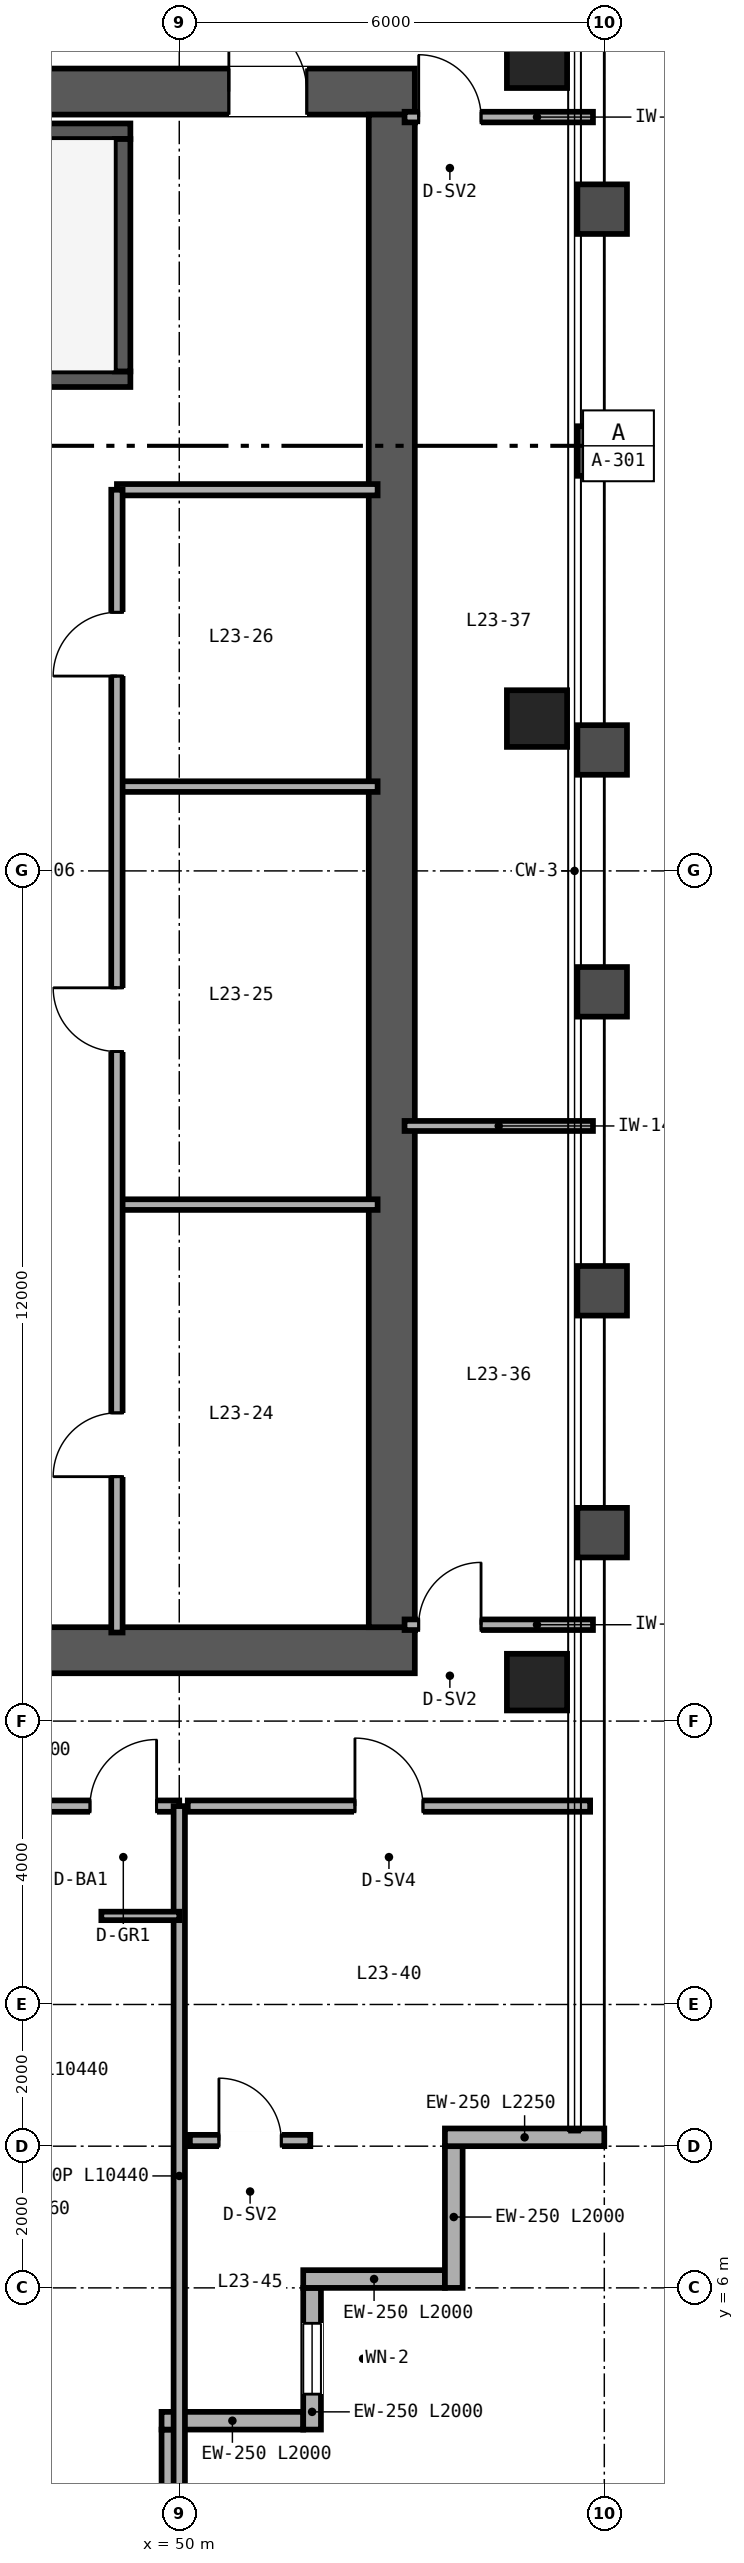
"""IFC4 building model, lengths in metres.
Left out: names, types, materials, properties, quantities, classifications, styles, units other than length and angle.
Written with IfcOpenShell. Run it as: python <this file> out.ifc"""

import sys

from ifc_helpers import new_model, si_unit, direction, frame, frame_2d, origin, origin_2d, place, context, subcontext, project, spatial, rectangle, hollow_rectangle, extrude, source, transform, mapped, element, fill, save


model = new_model("IFC4")
c1 = context("Model", 3, precision=1e-05, world=origin(), true_north=direction((0.0, 1.0)))
c2 = subcontext(c1, "Body", "Model", "MODEL_VIEW")
j1 = project(units=[si_unit("LENGTHUNIT", "METRE"), si_unit("PLANEANGLEUNIT", "RADIAN")], contexts=[c1])
p1 = place(None, origin())
s1 = spatial("IfcSite", under=j1, at=p1, CompositionType="ELEMENT")
p2 = place(p1, origin())
s2 = spatial("IfcBuilding", under=s1, at=p2, CompositionType="ELEMENT")
p3 = place(p2, frame((0.0, 0.0, 97.2)))
s3 = spatial("IfcBuildingStorey", under=s2, at=p3, CompositionType="ELEMENT", Elevation=97.2)
p4 = place(p3, frame((40.675, 15.0, 0.0), z_axis=(0.0, 0.0, 1.0), x_axis=(1.0, 0.0, 0.0)))
e1 = element("IfcWall", 1, at=p4, inside=s3, PredefinedType="SHEAR", context=c2, shape_type="SweptSolid", body=[
    extrude(rectangle(XDim=12.65, YDim=0.65, at=frame_2d((6.325, 0.0))), origin(), (0.0, 0.0, 1.0), 3.36),
])
p5 = place(p4, frame((4.425, 0.0, 0.0)))
e2 = element("IfcOpeningElement", 2, at=p5, cuts=e1, PredefinedType="OPENING", context=c2, shape_type="SweptSolid", body=[
    extrude(rectangle(XDim=1.0, YDim=2.15, at=frame_2d((0.5, 1.075))), frame((0.0, 0.335, 0.0), z_axis=(0.0, -1.0, 0.0), x_axis=(1.0, 0.0, 0.0)), (0.0, 0.0, 1.0), 0.67),
])
p6 = place(p3, frame((40.675, 37.0, 0.0), z_axis=(0.0, 0.0, 1.0), x_axis=(1.0, 0.0, 0.0)))
e3 = element("IfcWall", 3, at=p6, inside=s3, PredefinedType="SHEAR", context=c2, shape_type="SweptSolid", body=[
    extrude(rectangle(XDim=12.65, YDim=0.65, at=frame_2d((6.325, 0.0))), origin(), (0.0, 0.0, 1.0), 3.36),
])
p7 = place(p6, frame((10.025, 0.0, 0.0)))
e4 = element("IfcOpeningElement", 4, at=p7, cuts=e3, PredefinedType="OPENING", context=c2, shape_type="SweptSolid", body=[
    extrude(rectangle(XDim=1.1, YDim=2.15, at=frame_2d((0.55, 1.075))), frame((0.0, 0.335, 0.0), z_axis=(0.0, -1.0, 0.0), x_axis=(1.0, 0.0, 0.0)), (0.0, 0.0, 1.0), 0.67),
])
p8 = place(p3, frame((53.0, 15.325, 0.0), z_axis=(0.0, 0.0, 1.0), x_axis=(0.0, 1.0, 0.0)))
e5 = element("IfcWall", 5, at=p8, inside=s3, PredefinedType="SHEAR", context=c2, shape_type="SweptSolid", body=[
    extrude(rectangle(XDim=21.35, YDim=0.65, at=frame_2d((10.675, 0.0))), origin(), (0.0, 0.0, 1.0), 3.36),
])
p9 = place(p3, frame((41.325, 32.94, 0.0), z_axis=(0.0, 0.0, 1.0), x_axis=(1.0, 0.0, 0.0)))
e6 = element("IfcWall", 6, at=p9, inside=s3, PredefinedType="SHEAR", context=c2, shape_type="SweptSolid", body=[
    extrude(rectangle(XDim=7.985, YDim=0.22, at=frame_2d((3.993, 0.0))), origin(), (0.0, 0.0, 1.0), 3.4),
])
p10 = place(p9, frame((0.595, 0.0, 0.0)))
e7 = element("IfcOpeningElement", 7, at=p10, cuts=e6, PredefinedType="OPENING", context=c2, shape_type="SweptSolid", body=[
    extrude(rectangle(XDim=1.05, YDim=2.15, at=frame_2d((0.525, 1.075))), frame((0.0, 0.12, 0.0), z_axis=(0.0, -1.0, 0.0), x_axis=(1.0, 0.0, 0.0)), (0.0, 0.0, 1.0), 0.24),
])
p11 = place(p3, frame((41.325, 36.44, 0.0), z_axis=(0.0, 0.0, 1.0), x_axis=(1.0, 0.0, 0.0)))
e8 = element("IfcWall", 8, at=p11, inside=s3, PredefinedType="SHEAR", context=c2, shape_type="SweptSolid", body=[
    extrude(rectangle(XDim=7.985, YDim=0.22, at=frame_2d((3.993, 0.0))), origin(), (0.0, 0.0, 1.0), 3.4),
])
p12 = place(p3, frame((49.2, 33.05, 0.0), z_axis=(0.0, 0.0, 1.0), x_axis=(0.0, 1.0, 0.0)))
e9 = element("IfcWall", 9, at=p12, inside=s3, PredefinedType="SHEAR", context=c2, shape_type="SweptSolid", body=[
    extrude(rectangle(XDim=3.28, YDim=0.22, at=frame_2d((1.64, 0.0))), origin(), (0.0, 0.0, 1.0), 3.4),
])
m1 = source(origin(), c2, "Body", "SweptSolid", [
    extrude(hollow_rectangle(XDim=0.85, YDim=0.8, WallThickness=0.032, at=origin_2d()), origin(), (0.0, 0.0, 1.0), 3.36),
])
for number, where, z_axis, x_axis in (
    (10, (55.05, 14.55, 0.0), (0.0, 0.0, 1.0), (1.0, 0.0, 0.0)),
    (11, (55.05, 28.15, 0.0), (0.0, 0.0, 1.0), (1.0, 0.0, 0.0)),
    (12, (55.05, 37.45, 0.0), (0.0, 0.0, 1.0), (1.0, 0.0, 0.0)),
):
    element("IfcColumn", number, at=place(p3, frame(where, z_axis=z_axis, x_axis=x_axis)), inside=s3, PredefinedType="COLUMN", context=c2, shape_type="MappedRepresentation", body=[
        mapped(m1, transform((0.0, 0.0, 0.0), scale=1.0)),
    ])
p13 = place(p3, frame((49.875, 2.0, 0.0), z_axis=(0.0, 0.0, 1.0), x_axis=(0.0, 1.0, 0.0)))
e13 = element("IfcWall", 13, at=p13, inside=s3, PredefinedType="SOLIDWALL", context=c2, shape_type="SweptSolid", body=[
    extrude(rectangle(XDim=2.0, YDim=0.25, at=frame_2d((1.0, 0.0))), origin(), (0.0, 0.0, 1.0), 2.667),
])
p14 = place(p3, frame((49.75, 4.125, 0.0), z_axis=(0.0, 0.0, 1.0), x_axis=(1.0, 0.0, 0.0)))
e14 = element("IfcWall", 14, at=p14, inside=s3, PredefinedType="SOLIDWALL", context=c2, shape_type="SweptSolid", body=[
    extrude(rectangle(XDim=2.0, YDim=0.25, at=frame_2d((1.0, 0.0))), origin(), (0.0, 0.0, 1.0), 3.36),
])
p15 = place(p3, frame((51.875, 4.0, 0.0), z_axis=(0.0, 0.0, 1.0), x_axis=(0.0, 1.0, 0.0)))
e15 = element("IfcWall", 15, at=p15, inside=s3, PredefinedType="SOLIDWALL", context=c2, shape_type="SweptSolid", body=[
    extrude(rectangle(XDim=2.0, YDim=0.25, at=frame_2d((1.0, 0.0))), origin(), (0.0, 0.0, 1.0), 3.36),
])
p16 = place(p15, frame((0.5, 0.0, 0.85)))
e16 = element("IfcOpeningElement", 16, at=p16, cuts=e15, PredefinedType="OPENING", context=c2, shape_type="SweptSolid", body=[
    extrude(rectangle(XDim=1.0, YDim=1.9, at=frame_2d((0.5, 0.95))), frame((0.0, 0.135, 0.0), z_axis=(0.0, -1.0, 0.0), x_axis=(1.0, 0.0, 0.0)), (0.0, 0.0, 1.0), 0.27),
])
for number, where, z_axis, x_axis in (
    (17, (51.75, 6.125, 0.0), (0.0, 0.0, 1.0), (1.0, 0.0, 0.0)),
    (18, (53.875, 6.0, 0.0), (0.0, 0.0, 1.0), (0.0, 1.0, 0.0)),
):
    element("IfcWall", number, at=place(p3, frame(where, z_axis=z_axis, x_axis=x_axis)), inside=s3, PredefinedType="SOLIDWALL", context=c2, shape_type="SweptSolid", body=[
        extrude(rectangle(XDim=2.0, YDim=0.25, at=frame_2d((1.0, 0.0))), origin(), (0.0, 0.0, 1.0), 3.36),
    ])
p17 = place(p3, frame((53.75, 8.125, 0.0), z_axis=(0.0, 0.0, 1.0), x_axis=(1.0, 0.0, 0.0)))
e19 = element("IfcWall", 19, at=p17, inside=s3, PredefinedType="SOLIDWALL", context=c2, shape_type="SweptSolid", body=[
    extrude(rectangle(XDim=2.25, YDim=0.25, at=frame_2d((1.125, 0.0))), origin(), (0.0, 0.0, 1.0), 3.36),
])
p18 = place(p3, frame((49.12, 31.38, 0.0), z_axis=(0.0, 0.0, 1.0), x_axis=(1.0, 0.0, 0.0)))
e20 = element("IfcWall", 20, at=p18, inside=s3, PredefinedType="PARTITIONING", context=c2, shape_type="SweptSolid", body=[
    extrude(rectangle(XDim=3.68, YDim=0.16, at=frame_2d((1.84, 0.0))), origin(), (0.0, 0.0, 1.0), 2.36),
])
for number, where, z_axis, x_axis in (
    (21, (49.12, 21.29, 0.0), (0.0, 0.0, 1.0), (1.0, 0.0, 0.0)),
    (22, (49.12, 27.19, 0.0), (0.0, 0.0, 1.0), (1.0, 0.0, 0.0)),
):
    element("IfcWall", number, at=place(p3, frame(where, z_axis=z_axis, x_axis=x_axis)), inside=s3, PredefinedType="PARTITIONING", context=c2, shape_type="SweptSolid", body=[
        extrude(rectangle(XDim=3.68, YDim=0.15, at=frame_2d((1.84, 0.0))), origin(), (0.0, 0.0, 1.0), 3.36),
    ])
p19 = place(p3, frame((49.12, 15.25, 0.0), z_axis=(0.0, 0.0, 1.0), x_axis=(0.0, 1.0, 0.0)))
e23 = element("IfcWall", 23, at=p19, inside=s3, PredefinedType="PARTITIONING", context=c2, shape_type="SweptSolid", body=[
    extrude(rectangle(XDim=16.13, YDim=0.16, at=frame_2d((8.065, 0.0))), origin(), (0.0, 0.0, 1.0), 2.36),
])
p20 = place(p19, frame((2.2, 0.0, 0.0)))
e24 = element("IfcOpeningElement", 24, at=p20, cuts=e23, PredefinedType="OPENING", context=c2, shape_type="SweptSolid", body=[
    extrude(rectangle(XDim=0.9, YDim=2.15, at=frame_2d((0.45, 1.075))), frame((0.0, 0.09, 0.0), z_axis=(0.0, -1.0, 0.0), x_axis=(1.0, 0.0, 0.0)), (0.0, 0.0, 1.0), 0.18),
])
p21 = place(p19, frame((8.2, 0.0, 0.0)))
e25 = element("IfcOpeningElement", 25, at=p21, cuts=e23, PredefinedType="OPENING", context=c2, shape_type="SweptSolid", body=[
    extrude(rectangle(XDim=0.9, YDim=2.15, at=frame_2d((0.45, 1.075))), frame((0.0, 0.09, 0.0), z_axis=(0.0, -1.0, 0.0), x_axis=(1.0, 0.0, 0.0)), (0.0, 0.0, 1.0), 0.18),
])
p22 = place(p19, frame((13.5, 0.0, 0.0)))
e26 = element("IfcOpeningElement", 26, at=p22, cuts=e23, PredefinedType="OPENING", context=c2, shape_type="SweptSolid", body=[
    extrude(rectangle(XDim=0.9, YDim=2.15, at=frame_2d((0.45, 1.075))), frame((0.0, 0.09, 0.0), z_axis=(0.0, -1.0, 0.0), x_axis=(1.0, 0.0, 0.0)), (0.0, 0.0, 1.0), 0.18),
])
p23 = place(p3, frame((53.18, 15.36, 0.0), z_axis=(0.0, 0.0, 1.0), x_axis=(1.0, 0.0, 0.0)))
e27 = element("IfcWall", 27, at=p23, inside=s3, PredefinedType="PARTITIONING", context=c2, shape_type="SweptSolid", body=[
    extrude(rectangle(XDim=2.66, YDim=0.15, at=frame_2d((1.33, 0.0))), origin(), (0.0, 0.0, 1.0), 2.581),
])
p24 = place(p23, frame((0.2, 0.0, 0.0)))
e28 = element("IfcOpeningElement", 28, at=p24, cuts=e27, PredefinedType="OPENING", context=c2, shape_type="SweptSolid", body=[
    extrude(rectangle(XDim=0.88, YDim=2.15, at=frame_2d((0.44, 1.075))), frame((0.0, 0.085, 0.0), z_axis=(0.0, -1.0, 0.0), x_axis=(1.0, 0.0, 0.0)), (0.0, 0.0, 1.0), 0.17),
])
p25 = place(p3, frame((53.18, 36.64, 0.0), z_axis=(0.0, 0.0, 1.0), x_axis=(1.0, 0.0, 0.0)))
e29 = element("IfcWall", 29, at=p25, inside=s3, PredefinedType="PARTITIONING", context=c2, shape_type="SweptSolid", body=[
    extrude(rectangle(XDim=2.66, YDim=0.15, at=frame_2d((1.33, 0.0))), origin(), (0.0, 0.0, 1.0), 2.743),
])
p26 = place(p25, frame((0.2, 0.0, 0.0)))
e30 = element("IfcOpeningElement", 30, at=p26, cuts=e29, PredefinedType="OPENING", context=c2, shape_type="SweptSolid", body=[
    extrude(rectangle(XDim=0.88, YDim=2.15, at=frame_2d((0.44, 1.075))), frame((0.0, 0.085, 0.0), z_axis=(0.0, -1.0, 0.0), x_axis=(1.0, 0.0, 0.0)), (0.0, 0.0, 1.0), 0.17),
])
p27 = place(p3, frame((53.18, 22.4, 0.0), z_axis=(0.0, 0.0, 1.0), x_axis=(1.0, 0.0, 0.0)))
e31 = element("IfcWall", 31, at=p27, inside=s3, PredefinedType="PARTITIONING", context=c2, shape_type="SweptSolid", body=[
    extrude(rectangle(XDim=2.66, YDim=0.142, at=frame_2d((1.33, 0.0))), origin(), (0.0, 0.0, 1.0), 2.581),
])
p28 = place(p3, frame((50.12, 12.8, 0.0), z_axis=(0.0, 0.0, 1.0), x_axis=(1.0, 0.0, 0.0)))
e32 = element("IfcWall", 32, at=p28, inside=s3, PredefinedType="PARTITIONING", context=c2, shape_type="SweptSolid", body=[
    extrude(rectangle(XDim=5.68, YDim=0.16, at=frame_2d((2.84, 0.0))), origin(), (0.0, 0.0, 1.0), 3.36),
])
p29 = place(p28, frame((2.36, 0.0, 0.0)))
e33 = element("IfcOpeningElement", 33, at=p29, cuts=e32, PredefinedType="OPENING", context=c2, shape_type="SweptSolid", body=[
    extrude(rectangle(XDim=0.96, YDim=2.15, at=frame_2d((0.48, 1.075))), frame((0.0, 0.09, 0.0), z_axis=(0.0, -1.0, 0.0), x_axis=(1.0, 0.0, 0.0)), (0.0, 0.0, 1.0), 0.18),
])
p30 = place(p3, frame((50.15, 8.08, 0.0), z_axis=(0.0, 0.0, 1.0), x_axis=(1.0, 0.0, 0.0)))
e34 = element("IfcWall", 34, at=p30, inside=s3, PredefinedType="PARTITIONING", context=c2, shape_type="SweptSolid", body=[
    extrude(rectangle(XDim=1.7, YDim=0.16, at=frame_2d((0.85, 0.0))), origin(), (0.0, 0.0, 1.0), 3.36),
])
p31 = place(p30, frame((0.41, 0.0, 0.0)))
e35 = element("IfcOpeningElement", 35, at=p31, cuts=e34, PredefinedType="OPENING", context=c2, shape_type="SweptSolid", body=[
    extrude(rectangle(XDim=0.88, YDim=2.15, at=frame_2d((0.44, 1.075))), frame((0.0, 0.09, 0.0), z_axis=(0.0, -1.0, 0.0), x_axis=(1.0, 0.0, 0.0)), (0.0, 0.0, 1.0), 0.18),
])
p32 = place(p3, frame((14.0, 12.8, 0.0), z_axis=(0.0, 0.0, 1.0), x_axis=(1.0, 0.0, 0.0)))
e36 = element("IfcWall", 36, at=p32, inside=s3, PredefinedType="PARTITIONING", context=c2, shape_type="SweptSolid", body=[
    extrude(rectangle(XDim=36.0, YDim=0.16, at=frame_2d((18.0, 0.0))), origin(), (0.0, 0.0, 1.0), 2.581),
])
p33 = place(p32, frame((3.14, 0.0, 0.0)))
e37 = element("IfcOpeningElement", 37, at=p33, cuts=e36, PredefinedType="OPENING", context=c2, shape_type="SweptSolid", body=[
    extrude(rectangle(XDim=0.94, YDim=2.15, at=frame_2d((0.47, 1.075))), frame((0.0, 0.09, 0.0), z_axis=(0.0, -1.0, 0.0), x_axis=(1.0, 0.0, 0.0)), (0.0, 0.0, 1.0), 0.18),
])
p34 = place(p32, frame((7.54, 0.0, 0.0)))
e38 = element("IfcOpeningElement", 38, at=p34, cuts=e36, PredefinedType="OPENING", context=c2, shape_type="SweptSolid", body=[
    extrude(rectangle(XDim=0.94, YDim=2.15, at=frame_2d((0.47, 1.075))), frame((0.0, 0.09, 0.0), z_axis=(0.0, -1.0, 0.0), x_axis=(1.0, 0.0, 0.0)), (0.0, 0.0, 1.0), 0.18),
])
p35 = place(p32, frame((12.14, 0.0, 0.0)))
e39 = element("IfcOpeningElement", 39, at=p35, cuts=e36, PredefinedType="OPENING", context=c2, shape_type="SweptSolid", body=[
    extrude(rectangle(XDim=0.94, YDim=2.15, at=frame_2d((0.47, 1.075))), frame((0.0, 0.09, 0.0), z_axis=(0.0, -1.0, 0.0), x_axis=(1.0, 0.0, 0.0)), (0.0, 0.0, 1.0), 0.18),
])
p36 = place(p32, frame((16.94, 0.0, 0.0)))
e40 = element("IfcOpeningElement", 40, at=p36, cuts=e36, PredefinedType="OPENING", context=c2, shape_type="SweptSolid", body=[
    extrude(rectangle(XDim=0.94, YDim=2.15, at=frame_2d((0.47, 1.075))), frame((0.0, 0.09, 0.0), z_axis=(0.0, -1.0, 0.0), x_axis=(1.0, 0.0, 0.0)), (0.0, 0.0, 1.0), 0.18),
])
p37 = place(p32, frame((21.74, 0.0, 0.0)))
e41 = element("IfcOpeningElement", 41, at=p37, cuts=e36, PredefinedType="OPENING", context=c2, shape_type="SweptSolid", body=[
    extrude(rectangle(XDim=0.94, YDim=2.15, at=frame_2d((0.47, 1.075))), frame((0.0, 0.09, 0.0), z_axis=(0.0, -1.0, 0.0), x_axis=(1.0, 0.0, 0.0)), (0.0, 0.0, 1.0), 0.18),
])
p38 = place(p32, frame((26.34, 0.0, 0.0)))
e42 = element("IfcOpeningElement", 42, at=p38, cuts=e36, PredefinedType="OPENING", context=c2, shape_type="SweptSolid", body=[
    extrude(rectangle(XDim=0.94, YDim=2.15, at=frame_2d((0.47, 1.075))), frame((0.0, 0.09, 0.0), z_axis=(0.0, -1.0, 0.0), x_axis=(1.0, 0.0, 0.0)), (0.0, 0.0, 1.0), 0.18),
])
p39 = place(p32, frame((30.54, 0.0, 0.0)))
e43 = element("IfcOpeningElement", 43, at=p39, cuts=e36, PredefinedType="OPENING", context=c2, shape_type="SweptSolid", body=[
    extrude(rectangle(XDim=0.94, YDim=2.15, at=frame_2d((0.47, 1.075))), frame((0.0, 0.09, 0.0), z_axis=(0.0, -1.0, 0.0), x_axis=(1.0, 0.0, 0.0)), (0.0, 0.0, 1.0), 0.18),
])
p40 = place(p32, frame((34.74, 0.0, 0.0)))
e44 = element("IfcOpeningElement", 44, at=p40, cuts=e36, PredefinedType="OPENING", context=c2, shape_type="SweptSolid", body=[
    extrude(rectangle(XDim=0.94, YDim=2.15, at=frame_2d((0.47, 1.075))), frame((0.0, 0.09, 0.0), z_axis=(0.0, -1.0, 0.0), x_axis=(1.0, 0.0, 0.0)), (0.0, 0.0, 1.0), 0.18),
])
p41 = place(p3, frame((50.0, 2.36, 0.0), z_axis=(0.0, 0.0, 1.0), x_axis=(0.0, 1.0, 0.0)))
e45 = element("IfcWall", 45, at=p41, inside=s3, PredefinedType="PARTITIONING", context=c2, shape_type="SweptSolid", body=[
    extrude(rectangle(XDim=10.44, YDim=0.16, at=frame_2d((5.22, 0.0))), origin(), (0.0, 0.0, 1.0), 2.667),
])
p42 = place(p3, frame((48.9, 11.25, 0.0), z_axis=(0.0, 0.0, 1.0), x_axis=(1.0, 0.0, 0.0)))
e46 = element("IfcWall", 46, at=p42, inside=s3, PredefinedType="PARTITIONING", context=c2, shape_type="SweptSolid", body=[
    extrude(rectangle(XDim=1.1, YDim=0.12, at=frame_2d((0.55, 0.0))), origin(), (0.0, 0.0, 1.0), 3.36),
])
m2 = source(origin(), c2, "Body", "SweptSolid", [
    extrude(rectangle(XDim=1.0, YDim=1.9, at=frame_2d((0.5, 0.95))), frame((0.0, 0.03, 0.0), z_axis=(0.0, -1.0, 0.0), x_axis=(1.0, 0.0, 0.0)), (0.0, 0.0, 1.0), 0.06),
])
p43 = place(p16, origin())
e47 = element("IfcWindow", 47, at=p43, inside=s3, PartitioningType="SINGLE_PANEL", PredefinedType="WINDOW", context=c2, shape_type="MappedRepresentation", body=[
    mapped(m2, transform((0.0, 0.0, 0.0), scale=1.0)),
])
fill(e16, e47)
m3 = source(origin(), c2, "Body", "SweptSolid", [
    extrude(rectangle(XDim=1.1, YDim=2.15, at=frame_2d((0.55, 1.075))), frame((0.0, 0.025, 0.0), z_axis=(0.0, -1.0, 0.0), x_axis=(1.0, 0.0, 0.0)), (0.0, 0.0, 1.0), 0.05),
])
p44 = place(p7, origin())
e48 = element("IfcDoor", 48, at=p44, inside=s3, OperationType="SINGLE_SWING_LEFT", PredefinedType="DOOR", context=c2, shape_type="MappedRepresentation", body=[
    mapped(m3, transform((0.0, 0.0, 0.0), scale=1.0)),
])
fill(e4, e48)
m4 = source(origin(), c2, "Body", "SweptSolid", [
    extrude(rectangle(XDim=0.9, YDim=2.15, at=frame_2d((0.45, 1.075))), frame((0.0, 0.025, 0.0), z_axis=(0.0, -1.0, 0.0), x_axis=(1.0, 0.0, 0.0)), (0.0, 0.0, 1.0), 0.05),
])
p45 = place(p20, origin())
e49 = element("IfcDoor", 49, at=p45, inside=s3, OperationType="SINGLE_SWING_LEFT", PredefinedType="DOOR", context=c2, shape_type="MappedRepresentation", body=[
    mapped(m4, transform((0.0, 0.0, 0.0), scale=1.0)),
])
fill(e24, e49)
p46 = place(p21, origin())
e50 = element("IfcDoor", 50, at=p46, inside=s3, OperationType="SINGLE_SWING_RIGHT", PredefinedType="DOOR", context=c2, shape_type="MappedRepresentation", body=[
    mapped(m4, transform((0.0, 0.0, 0.0), scale=1.0)),
])
fill(e25, e50)
p47 = place(p22, origin())
e51 = element("IfcDoor", 51, at=p47, inside=s3, OperationType="SINGLE_SWING_LEFT", PredefinedType="DOOR", context=c2, shape_type="MappedRepresentation", body=[
    mapped(m4, transform((0.0, 0.0, 0.0), scale=1.0)),
])
fill(e26, e51)
m5 = source(origin(), c2, "Body", "SweptSolid", [
    extrude(rectangle(XDim=0.88, YDim=2.15, at=frame_2d((0.44, 1.075))), frame((0.0, 0.025, 0.0), z_axis=(0.0, -1.0, 0.0), x_axis=(1.0, 0.0, 0.0)), (0.0, 0.0, 1.0), 0.05),
])
p48 = place(p24, origin())
e52 = element("IfcDoor", 52, at=p48, inside=s3, OperationType="SINGLE_SWING_RIGHT", PredefinedType="DOOR", context=c2, shape_type="MappedRepresentation", body=[
    mapped(m5, transform((0.0, 0.0, 0.0), scale=1.0)),
])
fill(e28, e52)
p49 = place(p26, origin())
e53 = element("IfcDoor", 53, at=p49, inside=s3, OperationType="SINGLE_SWING_LEFT", PredefinedType="DOOR", context=c2, shape_type="MappedRepresentation", body=[
    mapped(m5, transform((0.0, 0.0, 0.0), scale=1.0)),
])
fill(e30, e53)
m6 = source(origin(), c2, "Body", "SweptSolid", [
    extrude(rectangle(XDim=0.96, YDim=2.15, at=frame_2d((0.48, 1.075))), frame((0.0, 0.025, 0.0), z_axis=(0.0, -1.0, 0.0), x_axis=(1.0, 0.0, 0.0)), (0.0, 0.0, 1.0), 0.05),
])
p50 = place(p29, origin())
e54 = element("IfcDoor", 54, at=p50, inside=s3, OperationType="SINGLE_SWING_LEFT", PredefinedType="DOOR", context=c2, shape_type="MappedRepresentation", body=[
    mapped(m6, transform((0.0, 0.0, 0.0), scale=1.0)),
])
fill(e33, e54)
p51 = place(p31, origin())
e55 = element("IfcDoor", 55, at=p51, inside=s3, OperationType="SINGLE_SWING_LEFT", PredefinedType="DOOR", context=c2, shape_type="MappedRepresentation", body=[
    mapped(m5, transform((0.0, 0.0, 0.0), scale=1.0)),
])
fill(e35, e55)
m7 = source(origin(), c2, "Body", "SweptSolid", [
    extrude(rectangle(XDim=0.94, YDim=2.15, at=frame_2d((0.47, 1.075))), frame((0.0, 0.025, 0.0), z_axis=(0.0, -1.0, 0.0), x_axis=(1.0, 0.0, 0.0)), (0.0, 0.0, 1.0), 0.05),
])
p52 = place(p40, origin())
e56 = element("IfcDoor", 56, at=p52, inside=s3, OperationType="SINGLE_SWING_RIGHT", PredefinedType="DOOR", context=c2, shape_type="MappedRepresentation", body=[
    mapped(m7, transform((0.0, 0.0, 0.0), scale=1.0)),
])
fill(e44, e56)
save(model, sys.argv[1])
